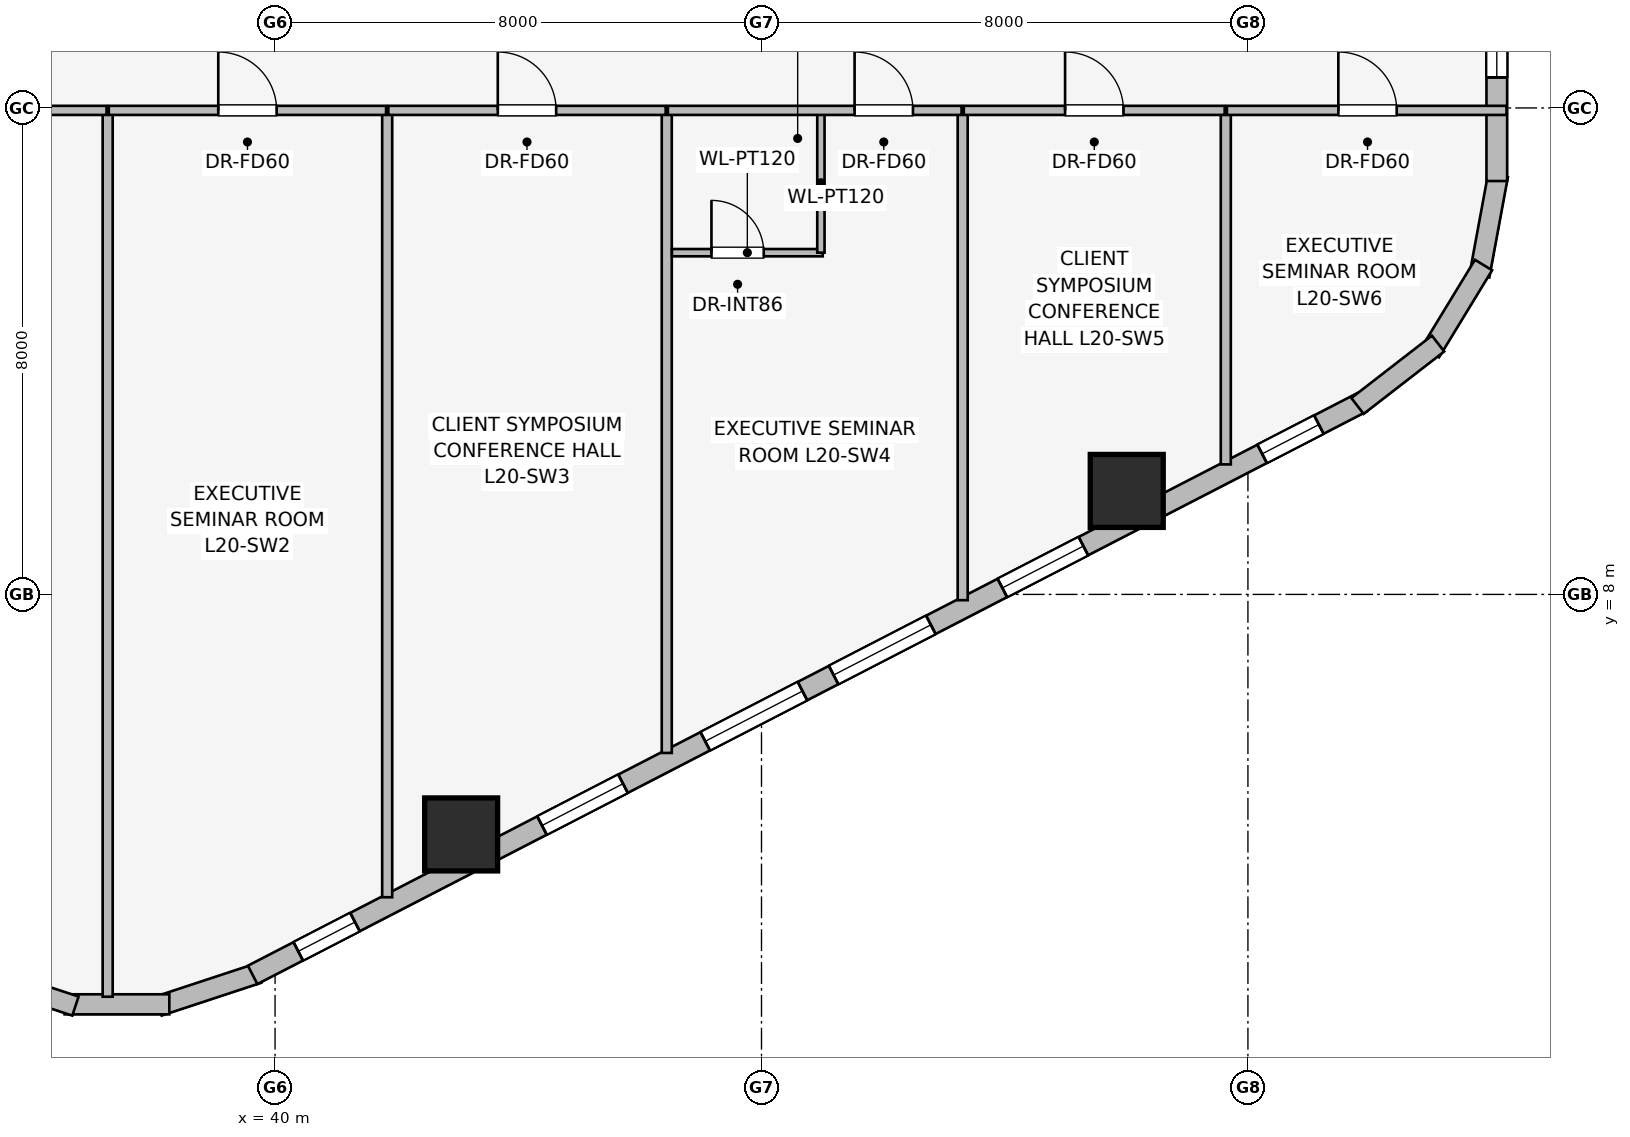
"""IFC4 building model, lengths in metres.
Left out: names, types, materials, properties, quantities, classifications, styles, units other than length and angle.
Written with IfcOpenShell. Run it as: python <this file> out.ifc"""

import sys

from ifc_helpers import new_model, si_unit, direction, frame, frame_2d, origin, origin_2d, place, context, subcontext, project, spatial, rectangle, extrude, element, fill, save


model = new_model("IFC4")
c1 = context("Model", 3, precision=1e-05, world=origin(), true_north=direction((0.0, 1.0)))
c2 = subcontext(c1, "Body", "Model", "MODEL_VIEW")
j1 = project(units=[si_unit("LENGTHUNIT", "METRE"), si_unit("PLANEANGLEUNIT", "RADIAN")], contexts=[c1])
p1 = place(None, origin())
s1 = spatial("IfcSite", under=j1, at=p1, CompositionType="ELEMENT")
p2 = place(p1, origin())
s2 = spatial("IfcBuilding", under=s1, at=p2, CompositionType="ELEMENT")
p3 = place(p2, frame((0.0, 0.0, 78.1)))
s3 = spatial("IfcBuildingStorey", under=s2, at=p3, CompositionType="ELEMENT", Elevation=78.1)
for number, where, z_axis, x_axis in (
    (1, (43.06, 4.053, 0.0), (0.0, 0.0, 1.0), (1.0, 0.0, 0.0)),
    (2, (54.007, 9.702, 0.0), (0.0, 0.0, 1.0), (1.0, 0.0, 0.0)),
):
    element("IfcColumn", number, at=place(p3, frame(where, z_axis=z_axis, x_axis=x_axis)), inside=s3, PredefinedType="COLUMN", context=c2, shape_type="SweptSolid", body=[
        extrude(rectangle(XDim=1.2, YDim=1.2, at=origin_2d()), origin(), (0.0, 0.0, 1.0), 3.65),
    ])
p4 = place(p3, frame((39.719, 1.769, 0.0), z_axis=(0.0, 0.0, 1.0), x_axis=(-0.94976901097, -0.312951794691, 0.0)))
e3 = element("IfcWall", 3, at=p4, inside=s3, PredefinedType="STANDARD", context=c2, shape_type="SweptSolid", body=[
    extrude(rectangle(XDim=1.722, YDim=0.33, at=frame_2d((0.861, 0.0))), origin(), (0.0, 0.0, 1.0), 3.39),
])
p5 = place(p3, frame((38.261, 1.259, 0.0), z_axis=(0.0, 0.0, 1.0), x_axis=(-1.0, 0.0, 0.0)))
e4 = element("IfcWall", 4, at=p5, inside=s3, PredefinedType="STANDARD", context=c2, shape_type="SweptSolid", body=[
    extrude(rectangle(XDim=1.722, YDim=0.33, at=frame_2d((0.861, 0.0))), origin(), (0.0, 0.0, 1.0), 3.39),
])
p6 = place(p3, frame((36.717, 1.23, 0.0), z_axis=(0.0, 0.0, 1.0), x_axis=(-0.94976901097, 0.312951794691, 0.0)))
e5 = element("IfcWall", 5, at=p6, inside=s3, PredefinedType="STANDARD", context=c2, shape_type="SweptSolid", body=[
    extrude(rectangle(XDim=1.722, YDim=0.33, at=frame_2d((0.861, 0.0))), origin(), (0.0, 0.0, 1.0), 3.39),
])
p7 = place(p3, frame((57.876, 11.159, 0.0), z_axis=(0.0, 0.0, 1.0), x_axis=(-0.888634413993, -0.458616264721, 0.0)))
e6 = element("IfcWall", 6, at=p7, inside=s3, PredefinedType="STANDARD", context=c2, shape_type="SweptSolid", body=[
    extrude(rectangle(XDim=20.531, YDim=0.34, at=frame_2d((10.266, 0.0))), origin(), (0.0, 0.0, 1.0), 2.684),
])
p8 = place(p7, frame((0.798, 0.0, 0.75)))
e7 = element("IfcOpeningElement", 7, at=p8, cuts=e6, PredefinedType="OPENING", context=c2, shape_type="SweptSolid", body=[
    extrude(rectangle(XDim=1.05, YDim=1.4, at=frame_2d((0.525, 0.7))), frame((0.0, 0.18, 0.0), z_axis=(0.0, -1.0, 0.0), x_axis=(1.0, 0.0, 0.0)), (0.0, 0.0, 1.0), 0.36),
])
p9 = place(p7, frame((5.156, 0.0, 0.75)))
e8 = element("IfcOpeningElement", 8, at=p9, cuts=e6, PredefinedType="OPENING", context=c2, shape_type="SweptSolid", body=[
    extrude(rectangle(XDim=1.5, YDim=1.5, at=frame_2d((0.75, 0.75))), frame((0.0, 0.18, 0.0), z_axis=(0.0, -1.0, 0.0), x_axis=(1.0, 0.0, 0.0)), (0.0, 0.0, 1.0), 0.36),
])
p10 = place(p7, frame((7.979, 0.0, 0.75)))
e9 = element("IfcOpeningElement", 9, at=p10, cuts=e6, PredefinedType="OPENING", context=c2, shape_type="SweptSolid", body=[
    extrude(rectangle(XDim=1.8, YDim=1.5, at=frame_2d((0.9, 0.75))), frame((0.0, 0.18, 0.0), z_axis=(0.0, -1.0, 0.0), x_axis=(1.0, 0.0, 0.0)), (0.0, 0.0, 1.0), 0.36),
])
p11 = place(p7, frame((10.355, 0.0, 0.75)))
e10 = element("IfcOpeningElement", 10, at=p11, cuts=e6, PredefinedType="OPENING", context=c2, shape_type="SweptSolid", body=[
    extrude(rectangle(XDim=1.8, YDim=1.5, at=frame_2d((0.9, 0.75))), frame((0.0, 0.18, 0.0), z_axis=(0.0, -1.0, 0.0), x_axis=(1.0, 0.0, 0.0)), (0.0, 0.0, 1.0), 0.36),
])
p12 = place(p7, frame((13.676, 0.0, 0.75)))
e11 = element("IfcOpeningElement", 11, at=p12, cuts=e6, PredefinedType="OPENING", context=c2, shape_type="SweptSolid", body=[
    extrude(rectangle(XDim=1.5, YDim=1.5, at=frame_2d((0.75, 0.75))), frame((0.0, 0.18, 0.0), z_axis=(0.0, -1.0, 0.0), x_axis=(1.0, 0.0, 0.0)), (0.0, 0.0, 1.0), 0.36),
])
p13 = place(p7, frame((18.637, 0.0, 0.75)))
e12 = element("IfcOpeningElement", 12, at=p13, cuts=e6, PredefinedType="OPENING", context=c2, shape_type="SweptSolid", body=[
    extrude(rectangle(XDim=1.05, YDim=1.4, at=frame_2d((0.525, 0.7))), frame((0.0, 0.18, 0.0), z_axis=(0.0, -1.0, 0.0), x_axis=(1.0, 0.0, 0.0)), (0.0, 0.0, 1.0), 0.36),
])
p14 = place(p3, frame((60.113, 14.892, 0.0), z_axis=(0.0, 0.0, 1.0), x_axis=(-0.181714143354, -0.983351397063, 0.0)))
e13 = element("IfcWall", 13, at=p14, inside=s3, PredefinedType="STANDARD", context=c2, shape_type="SweptSolid", body=[
    extrude(rectangle(XDim=1.678, YDim=0.33, at=frame_2d((0.839, 0.0))), origin(), (0.0, 0.0, 1.0), 3.39),
])
p15 = place(p3, frame((59.875, 13.417, 0.0), z_axis=(0.0, 0.0, 1.0), x_axis=(-0.520584129191, -0.853810379671, 0.0)))
e14 = element("IfcWall", 14, at=p15, inside=s3, PredefinedType="STANDARD", context=c2, shape_type="SweptSolid", body=[
    extrude(rectangle(XDim=1.677, YDim=0.33, at=frame_2d((0.838, 0.0))), origin(), (0.0, 0.0, 1.0), 3.39),
])
p16 = place(p3, frame((59.127, 12.125, 0.0), z_axis=(0.0, 0.0, 1.0), x_axis=(-0.790691856293, -0.61221433207, 0.0)))
e15 = element("IfcWall", 15, at=p16, inside=s3, PredefinedType="STANDARD", context=c2, shape_type="SweptSolid", body=[
    extrude(rectangle(XDim=1.676, YDim=0.33, at=frame_2d((0.838, 0.0))), origin(), (0.0, 0.0, 1.0), 3.39),
])
p17 = place(p3, frame((60.093, 33.202, 0.0), z_axis=(0.0, 0.0, 1.0), x_axis=(0.0, -1.0, 0.0)))
e16 = element("IfcWall", 16, at=p17, inside=s3, PredefinedType="STANDARD", context=c2, shape_type="SweptSolid", body=[
    extrude(rectangle(XDim=18.404, YDim=0.34, at=frame_2d((9.202, 0.0))), origin(), (0.0, 0.0, 1.0), 2.684),
])
p18 = place(p17, frame((1.744, 0.0, 0.75)))
e17 = element("IfcOpeningElement", 17, at=p18, cuts=e16, PredefinedType="OPENING", context=c2, shape_type="SweptSolid", body=[
    extrude(rectangle(XDim=1.05, YDim=1.4, at=frame_2d((0.525, 0.7))), frame((0.0, 0.18, 0.0), z_axis=(0.0, -1.0, 0.0), x_axis=(1.0, 0.0, 0.0)), (0.0, 0.0, 1.0), 0.36),
])
p19 = place(p17, frame((5.298, 0.0, 0.75)))
e18 = element("IfcOpeningElement", 18, at=p19, cuts=e16, PredefinedType="OPENING", context=c2, shape_type="SweptSolid", body=[
    extrude(rectangle(XDim=1.5, YDim=1.5, at=frame_2d((0.75, 0.75))), frame((0.0, 0.18, 0.0), z_axis=(0.0, -1.0, 0.0), x_axis=(1.0, 0.0, 0.0)), (0.0, 0.0, 1.0), 0.36),
])
p20 = place(p17, frame((8.793, 0.0, 0.75)))
e19 = element("IfcOpeningElement", 19, at=p20, cuts=e16, PredefinedType="OPENING", context=c2, shape_type="SweptSolid", body=[
    extrude(rectangle(XDim=1.05, YDim=1.4, at=frame_2d((0.525, 0.7))), frame((0.0, 0.18, 0.0), z_axis=(0.0, -1.0, 0.0), x_axis=(1.0, 0.0, 0.0)), (0.0, 0.0, 1.0), 0.36),
])
p21 = place(p17, frame((11.722, 0.0, 0.75)))
e20 = element("IfcOpeningElement", 20, at=p21, cuts=e16, PredefinedType="OPENING", context=c2, shape_type="SweptSolid", body=[
    extrude(rectangle(XDim=1.5, YDim=1.5, at=frame_2d((0.75, 0.75))), frame((0.0, 0.18, 0.0), z_axis=(0.0, -1.0, 0.0), x_axis=(1.0, 0.0, 0.0)), (0.0, 0.0, 1.0), 0.36),
])
p22 = place(p17, frame((15.65, 0.0, 0.75)))
e21 = element("IfcOpeningElement", 21, at=p22, cuts=e16, PredefinedType="OPENING", context=c2, shape_type="SweptSolid", body=[
    extrude(rectangle(XDim=1.05, YDim=1.4, at=frame_2d((0.525, 0.7))), frame((0.0, 0.18, 0.0), z_axis=(0.0, -1.0, 0.0), x_axis=(1.0, 0.0, 0.0)), (0.0, 0.0, 1.0), 0.36),
])
p23 = place(p3, frame((37.247, 1.384, 0.0), z_axis=(0.0, 0.0, 1.0), x_axis=(0.0, 1.0, 0.0)))
e22 = element("IfcWall", 22, at=p23, inside=s3, PredefinedType="PARTITIONING", context=c2, shape_type="SweptSolid", body=[
    extrude(rectangle(XDim=14.546, YDim=0.165, at=frame_2d((7.273, 0.0))), origin(), (0.0, 0.0, 1.0), 3.39),
])
p24 = place(p3, frame((41.844, 3.02, 0.0), z_axis=(0.0, 0.0, 1.0), x_axis=(0.0, 1.0, 0.0)))
e23 = element("IfcWall", 23, at=p24, inside=s3, PredefinedType="PARTITIONING", context=c2, shape_type="SweptSolid", body=[
    extrude(rectangle(XDim=12.91, YDim=0.165, at=frame_2d((6.455, 0.0))), origin(), (0.0, 0.0, 1.0), 2.513),
])
p25 = place(p3, frame((46.442, 5.393, 0.0), z_axis=(0.0, 0.0, 1.0), x_axis=(0.0, 1.0, 0.0)))
e24 = element("IfcWall", 24, at=p25, inside=s3, PredefinedType="PARTITIONING", context=c2, shape_type="SweptSolid", body=[
    extrude(rectangle(XDim=10.537, YDim=0.165, at=frame_2d((5.269, 0.0))), origin(), (0.0, 0.0, 1.0), 3.39),
])
p26 = place(p3, frame((51.309, 7.905, 0.0), z_axis=(0.0, 0.0, 1.0), x_axis=(0.0, 1.0, 0.0)))
e25 = element("IfcWall", 25, at=p26, inside=s3, PredefinedType="PARTITIONING", context=c2, shape_type="SweptSolid", body=[
    extrude(rectangle(XDim=8.025, YDim=0.165, at=frame_2d((4.012, 0.0))), origin(), (0.0, 0.0, 1.0), 3.39),
])
p27 = place(p3, frame((55.636, 10.138, 0.0), z_axis=(0.0, 0.0, 1.0), x_axis=(0.0, 1.0, 0.0)))
e26 = element("IfcWall", 26, at=p27, inside=s3, PredefinedType="PARTITIONING", context=c2, shape_type="SweptSolid", body=[
    extrude(rectangle(XDim=5.792, YDim=0.165, at=frame_2d((2.896, 0.0))), origin(), (0.0, 0.0, 1.0), 3.39),
])
p28 = place(p3, frame((32.85, 15.96, 0.0), z_axis=(0.0, 0.0, 1.0), x_axis=(1.0, 0.0, 0.0)))
e27 = element("IfcWall", 27, at=p28, inside=s3, PredefinedType="PARTITIONING", context=c2, shape_type="SweptSolid", body=[
    extrude(rectangle(XDim=4.379, YDim=0.15, at=frame_2d((2.189, 0.0))), origin(), (0.0, 0.0, 1.0), 3.39),
])
p29 = place(p28, frame((1.71, 0.0, 0.0)))
e28 = element("IfcOpeningElement", 28, at=p29, cuts=e27, PredefinedType="OPENING", context=c2, shape_type="SweptSolid", body=[
    extrude(rectangle(XDim=0.96, YDim=2.0, at=frame_2d((0.48, 1.0))), frame((0.0, 0.085, 0.0), z_axis=(0.0, -1.0, 0.0), x_axis=(1.0, 0.0, 0.0)), (0.0, 0.0, 1.0), 0.17),
])
p30 = place(p3, frame((37.265, 15.96, 0.0), z_axis=(0.0, 0.0, 1.0), x_axis=(1.0, 0.0, 0.0)))
e29 = element("IfcWall", 29, at=p30, inside=s3, PredefinedType="PARTITIONING", context=c2, shape_type="SweptSolid", body=[
    extrude(rectangle(XDim=4.561, YDim=0.15, at=frame_2d((2.281, 0.0))), origin(), (0.0, 0.0, 1.0), 3.39),
])
p31 = place(p30, frame((1.801, 0.0, 0.0)))
e30 = element("IfcOpeningElement", 30, at=p31, cuts=e29, PredefinedType="OPENING", context=c2, shape_type="SweptSolid", body=[
    extrude(rectangle(XDim=0.96, YDim=2.0, at=frame_2d((0.48, 1.0))), frame((0.0, 0.085, 0.0), z_axis=(0.0, -1.0, 0.0), x_axis=(1.0, 0.0, 0.0)), (0.0, 0.0, 1.0), 0.17),
])
p32 = place(p3, frame((41.862, 15.96, 0.0), z_axis=(0.0, 0.0, 1.0), x_axis=(1.0, 0.0, 0.0)))
e31 = element("IfcWall", 31, at=p32, inside=s3, PredefinedType="PARTITIONING", context=c2, shape_type="SweptSolid", body=[
    extrude(rectangle(XDim=4.562, YDim=0.15, at=frame_2d((2.281, 0.0))), origin(), (0.0, 0.0, 1.0), 3.39),
])
p33 = place(p32, frame((1.801, 0.0, 0.0)))
e32 = element("IfcOpeningElement", 32, at=p33, cuts=e31, PredefinedType="OPENING", context=c2, shape_type="SweptSolid", body=[
    extrude(rectangle(XDim=0.96, YDim=2.0, at=frame_2d((0.48, 1.0))), frame((0.0, 0.085, 0.0), z_axis=(0.0, -1.0, 0.0), x_axis=(1.0, 0.0, 0.0)), (0.0, 0.0, 1.0), 0.17),
])
p34 = place(p3, frame((46.527, 13.62, 0.0), z_axis=(0.0, 0.0, 1.0), x_axis=(1.0, 0.0, 0.0)))
e33 = element("IfcWall", 33, at=p34, inside=s3, PredefinedType="PARTITIONING", context=c2, shape_type="SweptSolid", body=[
    extrude(rectangle(XDim=2.48, YDim=0.12, at=frame_2d((1.24, 0.0))), origin(), (0.0, 0.0, 1.0), 3.39),
])
p35 = place(p34, frame((0.65, 0.0, 0.0)))
e34 = element("IfcOpeningElement", 34, at=p35, cuts=e33, PredefinedType="OPENING", context=c2, shape_type="SweptSolid", body=[
    extrude(rectangle(XDim=0.86, YDim=2.0, at=frame_2d((0.43, 1.0))), frame((0.0, 0.07, 0.0), z_axis=(0.0, -1.0, 0.0), x_axis=(1.0, 0.0, 0.0)), (0.0, 0.0, 1.0), 0.14),
])
p36 = place(p3, frame((48.977, 13.62, 0.0), z_axis=(0.0, 0.0, 1.0), x_axis=(0.0, 1.0, 0.0)))
e35 = element("IfcWall", 35, at=p36, inside=s3, PredefinedType="PARTITIONING", context=c2, shape_type="SweptSolid", body=[
    extrude(rectangle(XDim=2.3, YDim=0.12, at=frame_2d((1.15, 0.0))), origin(), (0.0, 0.0, 1.0), 3.39),
])
p37 = place(p3, frame((46.46, 15.96, 0.0), z_axis=(0.0, 0.0, 1.0), x_axis=(1.0, 0.0, 0.0)))
e36 = element("IfcWall", 36, at=p37, inside=s3, PredefinedType="PARTITIONING", context=c2, shape_type="SweptSolid", body=[
    extrude(rectangle(XDim=4.831, YDim=0.15, at=frame_2d((2.416, 0.0))), origin(), (0.0, 0.0, 1.0), 3.39),
])
p38 = place(p37, frame((3.071, 0.0, 0.0)))
e37 = element("IfcOpeningElement", 37, at=p38, cuts=e36, PredefinedType="OPENING", context=c2, shape_type="SweptSolid", body=[
    extrude(rectangle(XDim=0.96, YDim=2.0, at=frame_2d((0.48, 1.0))), frame((0.0, 0.085, 0.0), z_axis=(0.0, -1.0, 0.0), x_axis=(1.0, 0.0, 0.0)), (0.0, 0.0, 1.0), 0.17),
])
p39 = place(p3, frame((51.327, 15.96, 0.0), z_axis=(0.0, 0.0, 1.0), x_axis=(1.0, 0.0, 0.0)))
e38 = element("IfcWall", 38, at=p39, inside=s3, PredefinedType="PARTITIONING", context=c2, shape_type="SweptSolid", body=[
    extrude(rectangle(XDim=4.291, YDim=0.15, at=frame_2d((2.146, 0.0))), origin(), (0.0, 0.0, 1.0), 3.39),
])
p40 = place(p39, frame((1.666, 0.0, 0.0)))
e39 = element("IfcOpeningElement", 39, at=p40, cuts=e38, PredefinedType="OPENING", context=c2, shape_type="SweptSolid", body=[
    extrude(rectangle(XDim=0.96, YDim=2.0, at=frame_2d((0.48, 1.0))), frame((0.0, 0.085, 0.0), z_axis=(0.0, -1.0, 0.0), x_axis=(1.0, 0.0, 0.0)), (0.0, 0.0, 1.0), 0.17),
])
p41 = place(p3, frame((55.654, 15.96, 0.0), z_axis=(0.0, 0.0, 1.0), x_axis=(1.0, 0.0, 0.0)))
e40 = element("IfcWall", 40, at=p41, inside=s3, PredefinedType="PARTITIONING", context=c2, shape_type="SweptSolid", body=[
    extrude(rectangle(XDim=4.599, YDim=0.15, at=frame_2d((2.299, 0.0))), origin(), (0.0, 0.0, 1.0), 3.39),
])
p42 = place(p41, frame((1.833, 0.0, 0.0)))
e41 = element("IfcOpeningElement", 41, at=p42, cuts=e40, PredefinedType="OPENING", context=c2, shape_type="SweptSolid", body=[
    extrude(rectangle(XDim=0.96, YDim=2.0, at=frame_2d((0.48, 1.0))), frame((0.0, 0.085, 0.0), z_axis=(0.0, -1.0, 0.0), x_axis=(1.0, 0.0, 0.0)), (0.0, 0.0, 1.0), 0.17),
])
p43 = place(p8, origin())
e42 = element("IfcWindow", 42, at=p43, inside=s3, PartitioningType="SINGLE_PANEL", PredefinedType="WINDOW", context=c2, shape_type="SweptSolid", body=[
    extrude(rectangle(XDim=1.05, YDim=1.4, at=frame_2d((0.525, 0.7))), frame((0.0, 0.03, 0.0), z_axis=(0.0, -1.0, 0.0), x_axis=(1.0, 0.0, 0.0)), (0.0, 0.0, 1.0), 0.06),
])
fill(e7, e42)
p44 = place(p9, origin())
e43 = element("IfcWindow", 43, at=p44, inside=s3, PartitioningType="SINGLE_PANEL", PredefinedType="WINDOW", context=c2, shape_type="SweptSolid", body=[
    extrude(rectangle(XDim=1.5, YDim=1.5, at=frame_2d((0.75, 0.75))), frame((0.0, 0.03, 0.0), z_axis=(0.0, -1.0, 0.0), x_axis=(1.0, 0.0, 0.0)), (0.0, 0.0, 1.0), 0.06),
])
fill(e8, e43)
p45 = place(p10, origin())
e44 = element("IfcWindow", 44, at=p45, inside=s3, PartitioningType="SINGLE_PANEL", PredefinedType="WINDOW", context=c2, shape_type="SweptSolid", body=[
    extrude(rectangle(XDim=1.8, YDim=1.5, at=frame_2d((0.9, 0.75))), frame((0.0, 0.03, 0.0), z_axis=(0.0, -1.0, 0.0), x_axis=(1.0, 0.0, 0.0)), (0.0, 0.0, 1.0), 0.06),
])
fill(e9, e44)
p46 = place(p11, origin())
e45 = element("IfcWindow", 45, at=p46, inside=s3, PartitioningType="SINGLE_PANEL", PredefinedType="WINDOW", context=c2, shape_type="SweptSolid", body=[
    extrude(rectangle(XDim=1.8, YDim=1.5, at=frame_2d((0.9, 0.75))), frame((0.0, 0.03, 0.0), z_axis=(0.0, -1.0, 0.0), x_axis=(1.0, 0.0, 0.0)), (0.0, 0.0, 1.0), 0.06),
])
fill(e10, e45)
p47 = place(p12, origin())
e46 = element("IfcWindow", 46, at=p47, inside=s3, PartitioningType="SINGLE_PANEL", PredefinedType="WINDOW", context=c2, shape_type="SweptSolid", body=[
    extrude(rectangle(XDim=1.5, YDim=1.5, at=frame_2d((0.75, 0.75))), frame((0.0, 0.03, 0.0), z_axis=(0.0, -1.0, 0.0), x_axis=(1.0, 0.0, 0.0)), (0.0, 0.0, 1.0), 0.06),
])
fill(e11, e46)
p48 = place(p13, origin())
e47 = element("IfcWindow", 47, at=p48, inside=s3, PartitioningType="SINGLE_PANEL", PredefinedType="WINDOW", context=c2, shape_type="SweptSolid", body=[
    extrude(rectangle(XDim=1.05, YDim=1.4, at=frame_2d((0.525, 0.7))), frame((0.0, 0.03, 0.0), z_axis=(0.0, -1.0, 0.0), x_axis=(1.0, 0.0, 0.0)), (0.0, 0.0, 1.0), 0.06),
])
fill(e12, e47)
p49 = place(p22, origin())
e48 = element("IfcWindow", 48, at=p49, inside=s3, PartitioningType="SINGLE_PANEL", PredefinedType="WINDOW", context=c2, shape_type="SweptSolid", body=[
    extrude(rectangle(XDim=1.05, YDim=1.4, at=frame_2d((0.525, 0.7))), frame((0.0, 0.03, 0.0), z_axis=(0.0, -1.0, 0.0), x_axis=(1.0, 0.0, 0.0)), (0.0, 0.0, 1.0), 0.06),
])
fill(e21, e48)
p50 = place(p31, origin())
e49 = element("IfcDoor", 49, at=p50, inside=s3, OperationType="SINGLE_SWING_LEFT", PredefinedType="DOOR", context=c2, shape_type="SweptSolid", body=[
    extrude(rectangle(XDim=0.96, YDim=2.0, at=frame_2d((0.48, 1.0))), frame((0.0, 0.025, 0.0), z_axis=(0.0, -1.0, 0.0), x_axis=(1.0, 0.0, 0.0)), (0.0, 0.0, 1.0), 0.05),
])
fill(e30, e49)
p51 = place(p33, origin())
e50 = element("IfcDoor", 50, at=p51, inside=s3, OperationType="SINGLE_SWING_LEFT", PredefinedType="DOOR", context=c2, shape_type="SweptSolid", body=[
    extrude(rectangle(XDim=0.96, YDim=2.0, at=frame_2d((0.48, 1.0))), frame((0.0, 0.025, 0.0), z_axis=(0.0, -1.0, 0.0), x_axis=(1.0, 0.0, 0.0)), (0.0, 0.0, 1.0), 0.05),
])
fill(e32, e50)
p52 = place(p35, origin())
e51 = element("IfcDoor", 51, at=p52, inside=s3, OperationType="SINGLE_SWING_LEFT", PredefinedType="DOOR", context=c2, shape_type="SweptSolid", body=[
    extrude(rectangle(XDim=0.86, YDim=2.0, at=frame_2d((0.43, 1.0))), frame((0.0, 0.025, 0.0), z_axis=(0.0, -1.0, 0.0), x_axis=(1.0, 0.0, 0.0)), (0.0, 0.0, 1.0), 0.05),
])
fill(e34, e51)
p53 = place(p38, origin())
e52 = element("IfcDoor", 52, at=p53, inside=s3, OperationType="SINGLE_SWING_LEFT", PredefinedType="DOOR", context=c2, shape_type="SweptSolid", body=[
    extrude(rectangle(XDim=0.96, YDim=2.0, at=frame_2d((0.48, 1.0))), frame((0.0, 0.025, 0.0), z_axis=(0.0, -1.0, 0.0), x_axis=(1.0, 0.0, 0.0)), (0.0, 0.0, 1.0), 0.05),
])
fill(e37, e52)
p54 = place(p40, origin())
e53 = element("IfcDoor", 53, at=p54, inside=s3, OperationType="SINGLE_SWING_LEFT", PredefinedType="DOOR", context=c2, shape_type="SweptSolid", body=[
    extrude(rectangle(XDim=0.96, YDim=2.0, at=frame_2d((0.48, 1.0))), frame((0.0, 0.025, 0.0), z_axis=(0.0, -1.0, 0.0), x_axis=(1.0, 0.0, 0.0)), (0.0, 0.0, 1.0), 0.05),
])
fill(e39, e53)
p55 = place(p42, origin())
e54 = element("IfcDoor", 54, at=p55, inside=s3, OperationType="SINGLE_SWING_LEFT", PredefinedType="DOOR", context=c2, shape_type="SweptSolid", body=[
    extrude(rectangle(XDim=0.96, YDim=2.0, at=frame_2d((0.48, 1.0))), frame((0.0, 0.025, 0.0), z_axis=(0.0, -1.0, 0.0), x_axis=(1.0, 0.0, 0.0)), (0.0, 0.0, 1.0), 0.05),
])
fill(e41, e54)
save(model, sys.argv[1])
